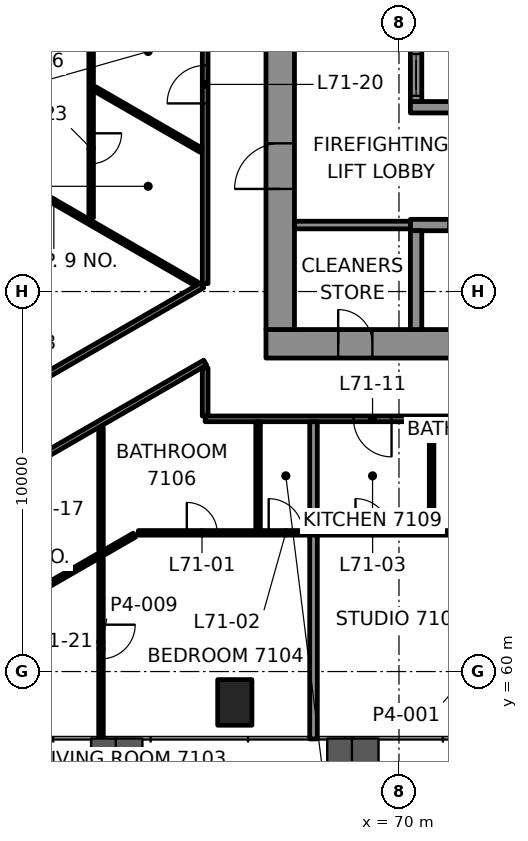
"""IFC4 building model, lengths in metres.
Left out: names, types, materials, properties, quantities, classifications, styles, units other than length and angle.
Written with IfcOpenShell. Run it as: python <this file> out.ifc"""

import sys

from ifc_helpers import new_model, si_unit, direction, frame, frame_2d, origin, origin_2d, place, context, subcontext, project, spatial, rectangle, hollow_rectangle, extrude, element, fill, save


model = new_model("IFC4")
c1 = context("Model", 3, precision=1e-05, world=origin(), true_north=direction((0.0, 1.0)))
c2 = subcontext(c1, "Body", "Model", "MODEL_VIEW")
j1 = project(units=[si_unit("LENGTHUNIT", "METRE"), si_unit("PLANEANGLEUNIT", "RADIAN")], contexts=[c1])
p1 = place(None, origin())
s1 = spatial("IfcSite", under=j1, at=p1, CompositionType="ELEMENT")
p2 = place(p1, origin())
s2 = spatial("IfcBuilding", under=s1, at=p2, CompositionType="ELEMENT")
p3 = place(p2, frame((0.0, 0.0, 295.1)))
s3 = spatial("IfcBuildingStorey", under=s2, at=p3, CompositionType="ELEMENT", Elevation=295.1)
p4 = place(p3, frame((65.68, 59.188, -0.0), z_axis=(0.0, 0.0, 1.0), x_axis=(1.0, 0.0, 0.0)))
e1 = element("IfcColumn", 1, at=p4, inside=s3, PredefinedType="COLUMN", context=c2, shape_type="SweptSolid", body=[
    extrude(hollow_rectangle(XDim=0.9, YDim=1.2, WallThickness=0.06, at=origin_2d()), origin(), (0.0, 0.0, 1.0), 3.5),
])
p5 = place(p3, frame((66.5, 68.625, 0.0), z_axis=(0.0, 0.0, 1.0), x_axis=(1.0, 0.0, 0.0)))
e2 = element("IfcWall", 2, at=p5, inside=s3, PredefinedType="SHEAR", context=c2, shape_type="SweptSolid", body=[
    extrude(rectangle(XDim=17.0, YDim=0.75, at=frame_2d((8.5, 0.0))), origin(), (0.0, 0.0, 1.0), 3.3),
])
p6 = place(p5, frame((1.9, 0.0, 0.0)))
e3 = element("IfcOpeningElement", 3, at=p6, cuts=e2, PredefinedType="OPENING", context=c2, shape_type="SweptSolid", body=[
    extrude(rectangle(XDim=0.9, YDim=2.1, at=frame_2d((0.45, 1.05))), frame((0.0, 0.385, 0.0), z_axis=(0.0, -1.0, 0.0), x_axis=(1.0, 0.0, 0.0)), (0.0, 0.0, 1.0), 0.77),
])
p7 = place(p3, frame((66.875, 69.0, 0.0), z_axis=(0.0, 0.0, 1.0), x_axis=(0.0, 1.0, 0.0)))
e4 = element("IfcWall", 4, at=p7, inside=s3, PredefinedType="SHEAR", context=c2, shape_type="SweptSolid", body=[
    extrude(rectangle(XDim=12.0, YDim=0.75, at=frame_2d((6.0, 0.0))), origin(), (0.0, 0.0, 1.0), 3.3),
])
p8 = place(p7, frame((3.7, 0.0, 0.0)))
e5 = element("IfcOpeningElement", 5, at=p8, cuts=e4, PredefinedType="OPENING", context=c2, shape_type="SweptSolid", body=[
    extrude(rectangle(XDim=1.2, YDim=2.1, at=frame_2d((0.6, 1.05))), frame((0.0, 0.385, 0.0), z_axis=(0.0, -1.0, 0.0), x_axis=(1.0, 0.0, 0.0)), (0.0, 0.0, 1.0), 0.77),
])
p9 = place(p3, frame((70.3, 71.75, 0.0), z_axis=(0.0, 0.0, 1.0), x_axis=(1.0, 0.0, 0.0)))
e6 = element("IfcWall", 6, at=p9, inside=s3, PredefinedType="SHEAR", context=c2, shape_type="SweptSolid", body=[
    extrude(rectangle(XDim=11.5, YDim=0.3, at=frame_2d((5.75, 0.0))), origin(), (0.0, 0.0, 1.0), 3.3),
])
p10 = place(p9, frame((1.0, 0.0, 0.0)))
e7 = element("IfcOpeningElement", 7, at=p10, cuts=e6, PredefinedType="OPENING", context=c2, shape_type="SweptSolid", body=[
    extrude(rectangle(XDim=1.1, YDim=2.1, at=frame_2d((0.55, 1.05))), frame((0.0, 0.16, 0.0), z_axis=(0.0, -1.0, 0.0), x_axis=(1.0, 0.0, 0.0)), (0.0, 0.0, 1.0), 0.32),
])
p11 = place(p9, frame((3.8, 0.0, 0.0)))
e8 = element("IfcOpeningElement", 8, at=p11, cuts=e6, PredefinedType="OPENING", context=c2, shape_type="SweptSolid", body=[
    extrude(rectangle(XDim=1.1, YDim=2.1, at=frame_2d((0.55, 1.05))), frame((0.0, 0.16, 0.0), z_axis=(0.0, -1.0, 0.0), x_axis=(1.0, 0.0, 0.0)), (0.0, 0.0, 1.0), 0.32),
])
p12 = place(p9, frame((6.6, 0.0, 0.0)))
e9 = element("IfcOpeningElement", 9, at=p12, cuts=e6, PredefinedType="OPENING", context=c2, shape_type="SweptSolid", body=[
    extrude(rectangle(XDim=1.1, YDim=2.1, at=frame_2d((0.55, 1.05))), frame((0.0, 0.16, 0.0), z_axis=(0.0, -1.0, 0.0), x_axis=(1.0, 0.0, 0.0)), (0.0, 0.0, 1.0), 0.32),
])
p13 = place(p9, frame((9.4, 0.0, 0.0)))
e10 = element("IfcOpeningElement", 10, at=p13, cuts=e6, PredefinedType="OPENING", context=c2, shape_type="SweptSolid", body=[
    extrude(rectangle(XDim=1.1, YDim=2.1, at=frame_2d((0.55, 1.05))), frame((0.0, 0.16, 0.0), z_axis=(0.0, -1.0, 0.0), x_axis=(1.0, 0.0, 0.0)), (0.0, 0.0, 1.0), 0.32),
])
p14 = place(p3, frame((70.3, 74.85, 0.0), z_axis=(0.0, 0.0, 1.0), x_axis=(1.0, 0.0, 0.0)))
e11 = element("IfcWall", 11, at=p14, inside=s3, PredefinedType="SHEAR", context=c2, shape_type="SweptSolid", body=[
    extrude(rectangle(XDim=5.9, YDim=0.3, at=frame_2d((2.95, 0.0))), origin(), (0.0, 0.0, 1.0), 3.3),
])
p15 = place(p14, frame((3.8, 0.0, 0.0)))
e12 = element("IfcOpeningElement", 12, at=p15, cuts=e11, PredefinedType="OPENING", context=c2, shape_type="SweptSolid", body=[
    extrude(rectangle(XDim=1.1, YDim=2.1, at=frame_2d((0.55, 1.05))), frame((0.0, 0.16, 0.0), z_axis=(0.0, -1.0, 0.0), x_axis=(1.0, 0.0, 0.0)), (0.0, 0.0, 1.0), 0.32),
])
p16 = place(p3, frame((70.45, 69.0, 0.0), z_axis=(0.0, 0.0, 1.0), x_axis=(0.0, 1.0, 0.0)))
e13 = element("IfcWall", 13, at=p16, inside=s3, PredefinedType="SHEAR", context=c2, shape_type="SweptSolid", body=[
    extrude(rectangle(XDim=2.6, YDim=0.3, at=frame_2d((1.3, 0.0))), origin(), (0.0, 0.0, 1.0), 3.3),
])
p17 = place(p3, frame((70.45, 75.0, 0.0), z_axis=(0.0, 0.0, 1.0), x_axis=(0.0, 1.0, 0.0)))
e14 = element("IfcWall", 14, at=p17, inside=s3, PredefinedType="SHEAR", context=c2, shape_type="SweptSolid", body=[
    extrude(rectangle(XDim=2.6, YDim=0.3, at=frame_2d((1.3, 0.0))), origin(), (0.0, 0.0, 1.0), 3.3),
])
p18 = place(p17, frame((0.15, 0.0, 0.0)))
e15 = element("IfcOpeningElement", 15, at=p18, cuts=e14, PredefinedType="OPENING", context=c2, shape_type="SweptSolid", body=[
    extrude(rectangle(XDim=1.1, YDim=2.1, at=frame_2d((0.55, 1.05))), frame((0.0, 0.16, 0.0), z_axis=(0.0, -1.0, 0.0), x_axis=(1.0, 0.0, 0.0)), (0.0, 0.0, 1.0), 0.32),
])
p19 = place(p3, frame((63.141, 63.65, 0.0), z_axis=(0.0, 0.0, 1.0), x_axis=(1.0, 0.0, 0.0)))
e16 = element("IfcWall", 16, at=p19, inside=s3, PredefinedType="PARTITIONING", context=c2, shape_type="SweptSolid", body=[
    extrude(rectangle(XDim=23.718, YDim=0.12, at=frame_2d((11.859, 0.0))), origin(), (0.0, 0.0, 1.0), 2.7),
])
p20 = place(p19, frame((1.276, 0.0, 0.0)))
e17 = element("IfcOpeningElement", 17, at=p20, cuts=e16, PredefinedType="OPENING", context=c2, shape_type="SweptSolid", body=[
    extrude(rectangle(XDim=0.8, YDim=2.1, at=frame_2d((0.4, 1.05))), frame((0.0, 0.07, 0.0), z_axis=(0.0, -1.0, 0.0), x_axis=(1.0, 0.0, 0.0)), (0.0, 0.0, 1.0), 0.14),
])
p21 = place(p19, frame((3.43, 0.0, 0.0)))
e18 = element("IfcOpeningElement", 18, at=p21, cuts=e16, PredefinedType="OPENING", context=c2, shape_type="SweptSolid", body=[
    extrude(rectangle(XDim=0.9, YDim=2.1, at=frame_2d((0.45, 1.05))), frame((0.0, 0.07, 0.0), z_axis=(0.0, -1.0, 0.0), x_axis=(1.0, 0.0, 0.0)), (0.0, 0.0, 1.0), 0.14),
])
p22 = place(p19, frame((5.715, 0.0, 0.0)))
e19 = element("IfcOpeningElement", 19, at=p22, cuts=e16, PredefinedType="OPENING", context=c2, shape_type="SweptSolid", body=[
    extrude(rectangle(XDim=0.9, YDim=2.1, at=frame_2d((0.45, 1.05))), frame((0.0, 0.07, 0.0), z_axis=(0.0, -1.0, 0.0), x_axis=(1.0, 0.0, 0.0)), (0.0, 0.0, 1.0), 0.14),
])
p23 = place(p19, frame((8.87, 0.0, 0.0)))
e20 = element("IfcOpeningElement", 20, at=p23, cuts=e16, PredefinedType="OPENING", context=c2, shape_type="SweptSolid", body=[
    extrude(rectangle(XDim=0.8, YDim=2.1, at=frame_2d((0.4, 1.05))), frame((0.0, 0.07, 0.0), z_axis=(0.0, -1.0, 0.0), x_axis=(1.0, 0.0, 0.0)), (0.0, 0.0, 1.0), 0.14),
])
p24 = place(p19, frame((11.928, 0.0, 0.0)))
e21 = element("IfcOpeningElement", 21, at=p24, cuts=e16, PredefinedType="OPENING", context=c2, shape_type="SweptSolid", body=[
    extrude(rectangle(XDim=0.9, YDim=2.1, at=frame_2d((0.45, 1.05))), frame((0.0, 0.07, 0.0), z_axis=(0.0, -1.0, 0.0), x_axis=(1.0, 0.0, 0.0)), (0.0, 0.0, 1.0), 0.14),
])
p25 = place(p19, frame((15.083, 0.0, 0.0)))
e22 = element("IfcOpeningElement", 22, at=p25, cuts=e16, PredefinedType="OPENING", context=c2, shape_type="SweptSolid", body=[
    extrude(rectangle(XDim=0.8, YDim=2.1, at=frame_2d((0.4, 1.05))), frame((0.0, 0.07, 0.0), z_axis=(0.0, -1.0, 0.0), x_axis=(1.0, 0.0, 0.0)), (0.0, 0.0, 1.0), 0.14),
])
p26 = place(p19, frame((18.141, 0.0, 0.0)))
e23 = element("IfcOpeningElement", 23, at=p26, cuts=e16, PredefinedType="OPENING", context=c2, shape_type="SweptSolid", body=[
    extrude(rectangle(XDim=0.9, YDim=2.1, at=frame_2d((0.45, 1.05))), frame((0.0, 0.07, 0.0), z_axis=(0.0, -1.0, 0.0), x_axis=(1.0, 0.0, 0.0)), (0.0, 0.0, 1.0), 0.14),
])
p27 = place(p19, frame((21.297, 0.0, 0.0)))
e24 = element("IfcOpeningElement", 24, at=p27, cuts=e16, PredefinedType="OPENING", context=c2, shape_type="SweptSolid", body=[
    extrude(rectangle(XDim=0.8, YDim=2.1, at=frame_2d((0.4, 1.05))), frame((0.0, 0.07, 0.0), z_axis=(0.0, -1.0, 0.0), x_axis=(1.0, 0.0, 0.0)), (0.0, 0.0, 1.0), 0.14),
])
p28 = place(p3, frame((85.1, 66.65, 0.0), z_axis=(0.0, 0.0, 1.0), x_axis=(-1.0, 0.0, 0.0)))
e25 = element("IfcWall", 25, at=p28, inside=s3, PredefinedType="PARTITIONING", context=c2, shape_type="SweptSolid", body=[
    extrude(rectangle(XDim=20.2, YDim=0.15, at=frame_2d((10.1, 0.0))), origin(), (0.0, 0.0, 1.0), 2.7),
])
p29 = place(p28, frame((2.869, 0.0, 0.0)))
e26 = element("IfcOpeningElement", 26, at=p29, cuts=e25, PredefinedType="OPENING", context=c2, shape_type="SweptSolid", body=[
    extrude(rectangle(XDim=1.0, YDim=2.1, at=frame_2d((0.5, 1.05))), frame((0.0, 0.085, 0.0), z_axis=(0.0, -1.0, 0.0), x_axis=(1.0, 0.0, 0.0)), (0.0, 0.0, 1.0), 0.17),
])
p30 = place(p28, frame((9.082, 0.0, 0.0)))
e27 = element("IfcOpeningElement", 27, at=p30, cuts=e25, PredefinedType="OPENING", context=c2, shape_type="SweptSolid", body=[
    extrude(rectangle(XDim=1.0, YDim=2.1, at=frame_2d((0.5, 1.05))), frame((0.0, 0.085, 0.0), z_axis=(0.0, -1.0, 0.0), x_axis=(1.0, 0.0, 0.0)), (0.0, 0.0, 1.0), 0.17),
])
p31 = place(p28, frame((15.296, 0.0, 0.0)))
e28 = element("IfcOpeningElement", 28, at=p31, cuts=e25, PredefinedType="OPENING", context=c2, shape_type="SweptSolid", body=[
    extrude(rectangle(XDim=1.0, YDim=2.1, at=frame_2d((0.5, 1.05))), frame((0.0, 0.085, 0.0), z_axis=(0.0, -1.0, 0.0), x_axis=(1.0, 0.0, 0.0)), (0.0, 0.0, 1.0), 0.17),
])
p32 = place(p3, frame((63.037, 63.59, 0.0), z_axis=(0.0, 0.0, 1.0), x_axis=(-0.866021245731, -0.500007201891, 0.0)))
e29 = element("IfcWall", 29, at=p32, inside=s3, PredefinedType="PARTITIONING", context=c2, shape_type="SweptSolid", body=[
    extrude(rectangle(XDim=8.906, YDim=0.12, at=frame_2d((4.453, 0.0))), origin(), (0.0, 0.0, 1.0), 2.7),
])
p33 = place(p32, frame((4.41, 0.0, 0.0)))
e30 = element("IfcOpeningElement", 30, at=p33, cuts=e29, PredefinedType="OPENING", context=c2, shape_type="SweptSolid", body=[
    extrude(rectangle(XDim=0.9, YDim=2.1, at=frame_2d((0.45, 1.05))), frame((0.0, 0.07, 0.0), z_axis=(0.0, -1.0, 0.0), x_axis=(1.0, 0.0, 0.0)), (0.0, 0.0, 1.0), 0.14),
])
p34 = place(p3, frame((64.9, 68.13, 0.0), z_axis=(0.0, 0.0, 1.0), x_axis=(-0.866024746207, -0.500001138955, 0.0)))
e31 = element("IfcWall", 31, at=p34, inside=s3, PredefinedType="PARTITIONING", context=c2, shape_type="SweptSolid", body=[
    extrude(rectangle(XDim=12.007, YDim=0.15, at=frame_2d((6.003, 0.0))), origin(), (0.0, 0.0, 1.0), 2.547),
])
p35 = place(p34, frame((6.611, 0.0, 0.0)))
e32 = element("IfcOpeningElement", 32, at=p35, cuts=e31, PredefinedType="OPENING", context=c2, shape_type="SweptSolid", body=[
    extrude(rectangle(XDim=1.0, YDim=2.1, at=frame_2d((0.5, 1.05))), frame((0.0, 0.085, 0.0), z_axis=(0.0, -1.0, 0.0), x_axis=(1.0, 0.0, 0.0)), (0.0, 0.0, 1.0), 0.17),
])
p36 = place(p3, frame((53.601, 63.685, 0.0), z_axis=(0.0, 0.0, 1.0), x_axis=(0.866024967991, 0.500000754816, 0.0)))
e33 = element("IfcWall", 33, at=p36, inside=s3, PredefinedType="PARTITIONING", context=c2, shape_type="SweptSolid", body=[
    extrude(rectangle(XDim=12.96, YDim=0.15, at=frame_2d((6.48, 0.0))), origin(), (0.0, 0.0, 1.0), 2.7),
])
p37 = place(p36, frame((6.03, 0.0, 0.0)))
e34 = element("IfcOpeningElement", 34, at=p37, cuts=e33, PredefinedType="OPENING", context=c2, shape_type="SweptSolid", body=[
    extrude(rectangle(XDim=0.9, YDim=2.1, at=frame_2d((0.45, 1.05))), frame((0.0, 0.085, 0.0), z_axis=(0.0, -1.0, 0.0), x_axis=(1.0, 0.0, 0.0)), (0.0, 0.0, 1.0), 0.17),
])
p38 = place(p3, frame((70.858, 63.71, 0.0), z_axis=(0.0, 0.0, 1.0), x_axis=(0.0, 1.0, 0.0)))
e35 = element("IfcWall", 35, at=p38, inside=s3, PredefinedType="PARTITIONING", context=c2, shape_type="SweptSolid", body=[
    extrude(rectangle(XDim=2.865, YDim=0.12, at=frame_2d((1.433, 0.0))), origin(), (0.0, 0.0, 1.0), 2.7),
])
p39 = place(p3, frame((67.751, 58.228, 0.0), z_axis=(0.0, 0.0, 1.0), x_axis=(0.0, 1.0, 0.0)))
e36 = element("IfcWall", 36, at=p39, inside=s3, PredefinedType="PARTITIONING", context=c2, shape_type="SweptSolid", body=[
    extrude(rectangle(XDim=5.363, YDim=0.2, at=frame_2d((2.681, 0.0))), origin(), (0.0, 0.0, 1.0), 2.688),
])
p40 = place(p3, frame((66.292, 63.71, 0.0), z_axis=(0.0, 0.0, 1.0), x_axis=(0.0, 1.0, 0.0)))
e37 = element("IfcWall", 37, at=p40, inside=s3, PredefinedType="PARTITIONING", context=c2, shape_type="SweptSolid", body=[
    extrude(rectangle(XDim=2.865, YDim=0.12, at=frame_2d((1.433, 0.0))), origin(), (0.0, 0.0, 1.0), 2.7),
])
p41 = place(p3, frame((64.9, 66.725, 0.0), z_axis=(0.0, 0.0, 1.0), x_axis=(0.0, 1.0, 0.0)))
e38 = element("IfcWall", 38, at=p41, inside=s3, PredefinedType="PARTITIONING", context=c2, shape_type="SweptSolid", body=[
    extrude(rectangle(XDim=1.268, YDim=0.15, at=frame_2d((0.634, 0.0))), origin(), (0.0, 0.0, 1.0), 2.547),
])
p42 = place(p3, frame((64.9, 70.208, 0.0), z_axis=(0.0, 0.0, 1.0), x_axis=(0.0, 1.0, 0.0)))
e39 = element("IfcWall", 39, at=p42, inside=s3, PredefinedType="PARTITIONING", context=c2, shape_type="SweptSolid", body=[
    extrude(rectangle(XDim=13.14, YDim=0.15, at=frame_2d((6.57, 0.0))), origin(), (0.0, 0.0, 1.0), 2.7),
])
p43 = place(p42, frame((4.743, 0.0, 0.0)))
e40 = element("IfcOpeningElement", 40, at=p43, cuts=e39, PredefinedType="OPENING", context=c2, shape_type="SweptSolid", body=[
    extrude(rectangle(XDim=1.0, YDim=2.1, at=frame_2d((0.5, 1.05))), frame((0.0, 0.085, 0.0), z_axis=(0.0, -1.0, 0.0), x_axis=(1.0, 0.0, 0.0)), (0.0, 0.0, 1.0), 0.17),
])
p44 = place(p3, frame((62.159, 62.979, 0.0), z_axis=(0.0, 0.0, 1.0), x_axis=(0.0, -1.0, 0.0)))
e41 = element("IfcWall", 41, at=p44, inside=s3, PredefinedType="PARTITIONING", context=c2, shape_type="SweptSolid", body=[
    extrude(rectangle(XDim=4.751, YDim=0.12, at=frame_2d((2.376, 0.0))), origin(), (0.0, 0.0, 1.0), 2.688),
])
p45 = place(p44, frame((1.746, 0.0, 0.0)))
e42 = element("IfcOpeningElement", 42, at=p45, cuts=e41, PredefinedType="OPENING", context=c2, shape_type="SweptSolid", body=[
    extrude(rectangle(XDim=0.9, YDim=2.1, at=frame_2d((0.45, 1.05))), frame((0.0, 0.07, 0.0), z_axis=(0.0, -1.0, 0.0), x_axis=(1.0, 0.0, 0.0)), (0.0, 0.0, 1.0), 0.14),
])
p46 = place(p3, frame((61.9, 85.855, 0.0), z_axis=(0.0, 0.0, 1.0), x_axis=(0.0, -1.0, 0.0)))
e43 = element("IfcWall", 43, at=p46, inside=s3, PredefinedType="PARTITIONING", context=c2, shape_type="SweptSolid", body=[
    extrude(rectangle(XDim=13.915, YDim=0.12, at=frame_2d((6.958, 0.0))), origin(), (0.0, 0.0, 1.0), 2.688),
])
p47 = place(p46, frame((8.224, 0.0, 0.0)))
e44 = element("IfcOpeningElement", 44, at=p47, cuts=e43, PredefinedType="OPENING", context=c2, shape_type="SweptSolid", body=[
    extrude(rectangle(XDim=0.9, YDim=2.1, at=frame_2d((0.45, 1.05))), frame((0.0, 0.07, 0.0), z_axis=(0.0, -1.0, 0.0), x_axis=(1.0, 0.0, 0.0)), (0.0, 0.0, 1.0), 0.14),
])
p48 = place(p46, frame((11.69, 0.0, 0.0)))
e45 = element("IfcOpeningElement", 45, at=p48, cuts=e43, PredefinedType="OPENING", context=c2, shape_type="SweptSolid", body=[
    extrude(rectangle(XDim=0.8, YDim=2.1, at=frame_2d((0.4, 1.05))), frame((0.0, 0.07, 0.0), z_axis=(0.0, -1.0, 0.0), x_axis=(1.0, 0.0, 0.0)), (0.0, 0.0, 1.0), 0.14),
])
p49 = place(p3, frame((64.791, 73.72, 0.0), z_axis=(0.0, 0.0, 1.0), x_axis=(-0.866033195618, 0.499986503906, 0.0)))
e46 = element("IfcWall", 46, at=p49, inside=s3, PredefinedType="PARTITIONING", context=c2, shape_type="SweptSolid", body=[
    extrude(rectangle(XDim=3.228, YDim=0.12, at=frame_2d((1.614, 0.0))), origin(), (0.0, 0.0, 1.0), 2.7),
])
p50 = place(p3, frame((64.67, 70.202, 0.0), z_axis=(0.0, 0.0, 1.0), x_axis=(-0.866027476775, 0.499996409458, 0.0)))
e47 = element("IfcWall", 47, at=p50, inside=s3, PredefinedType="PARTITIONING", context=c2, shape_type="SweptSolid", body=[
    extrude(rectangle(XDim=8.666, YDim=0.12, at=frame_2d((4.333, 0.0))), origin(), (0.0, 0.0, 1.0), 2.7),
])
p51 = place(p3, frame((62.159, 63.187, 0.0), z_axis=(0.0, 0.0, 1.0), x_axis=(0.0, 1.0, 0.0)))
e48 = element("IfcWall", 48, at=p51, inside=s3, PredefinedType="PARTITIONING", context=c2, shape_type="SweptSolid", body=[
    extrude(rectangle(XDim=3.233, YDim=0.12, at=frame_2d((1.617, 0.0))), origin(), (0.0, 0.0, 1.0), 2.547),
])
p52 = place(p3, frame((67.751, 63.71, 0.0), z_axis=(0.0, 0.0, 1.0), x_axis=(0.0, 1.0, 0.0)))
e49 = element("IfcWall", 49, at=p52, inside=s3, PredefinedType="PARTITIONING", context=c2, shape_type="SweptSolid", body=[
    extrude(rectangle(XDim=2.865, YDim=0.2, at=frame_2d((1.433, 0.0))), origin(), (0.0, 0.0, 1.0), 2.7),
])
p53 = place(p3, frame((67.25, 71.75, 0.0), z_axis=(0.0, 0.0, 1.0), x_axis=(1.0, 0.0, 0.0)))
e50 = element("IfcWall", 50, at=p53, inside=s3, PredefinedType="PARTITIONING", context=c2, shape_type="SweptSolid", body=[
    extrude(rectangle(XDim=3.05, YDim=0.2, at=frame_2d((1.525, 0.0))), origin(), (0.0, 0.0, 1.0), 3.3),
])
p54 = place(p20, origin())
e51 = element("IfcDoor", 51, at=p54, inside=s3, OperationType="SINGLE_SWING_RIGHT", PredefinedType="DOOR", context=c2, shape_type="SweptSolid", body=[
    extrude(rectangle(XDim=0.8, YDim=2.1, at=frame_2d((0.4, 1.05))), frame((0.0, 0.025, 0.0), z_axis=(0.0, -1.0, 0.0), x_axis=(1.0, 0.0, 0.0)), (0.0, 0.0, 1.0), 0.05),
])
fill(e17, e51)
p55 = place(p21, origin())
e52 = element("IfcDoor", 52, at=p55, inside=s3, OperationType="SINGLE_SWING_LEFT", PredefinedType="DOOR", context=c2, shape_type="SweptSolid", body=[
    extrude(rectangle(XDim=0.9, YDim=2.1, at=frame_2d((0.45, 1.05))), frame((0.0, 0.025, 0.0), z_axis=(0.0, -1.0, 0.0), x_axis=(1.0, 0.0, 0.0)), (0.0, 0.0, 1.0), 0.05),
])
fill(e18, e52)
p56 = place(p22, origin())
e53 = element("IfcDoor", 53, at=p56, inside=s3, OperationType="SINGLE_SWING_LEFT", PredefinedType="DOOR", context=c2, shape_type="SweptSolid", body=[
    extrude(rectangle(XDim=0.9, YDim=2.1, at=frame_2d((0.45, 1.05))), frame((0.0, 0.025, 0.0), z_axis=(0.0, -1.0, 0.0), x_axis=(1.0, 0.0, 0.0)), (0.0, 0.0, 1.0), 0.05),
])
fill(e19, e53)
p57 = place(p31, origin())
e54 = element("IfcDoor", 54, at=p57, inside=s3, OperationType="SINGLE_SWING_LEFT", PredefinedType="DOOR", context=c2, shape_type="SweptSolid", body=[
    extrude(rectangle(XDim=1.0, YDim=2.1, at=frame_2d((0.5, 1.05))), frame((0.0, 0.025, 0.0), z_axis=(0.0, -1.0, 0.0), x_axis=(1.0, 0.0, 0.0)), (0.0, 0.0, 1.0), 0.05),
])
fill(e28, e54)
p58 = place(p43, origin())
e55 = element("IfcDoor", 55, at=p58, inside=s3, OperationType="SINGLE_SWING_RIGHT", PredefinedType="DOOR", context=c2, shape_type="SweptSolid", body=[
    extrude(rectangle(XDim=1.0, YDim=2.1, at=frame_2d((0.5, 1.05))), frame((0.0, 0.025, 0.0), z_axis=(0.0, -1.0, 0.0), x_axis=(1.0, 0.0, 0.0)), (0.0, 0.0, 1.0), 0.05),
])
fill(e40, e55)
p59 = place(p45, origin())
e56 = element("IfcDoor", 56, at=p59, inside=s3, OperationType="SINGLE_SWING_LEFT", PredefinedType="DOOR", context=c2, shape_type="SweptSolid", body=[
    extrude(rectangle(XDim=0.9, YDim=2.1, at=frame_2d((0.45, 1.05))), frame((0.0, 0.025, 0.0), z_axis=(0.0, -1.0, 0.0), x_axis=(1.0, 0.0, 0.0)), (0.0, 0.0, 1.0), 0.05),
])
fill(e42, e56)
p60 = place(p48, origin())
e57 = element("IfcDoor", 57, at=p60, inside=s3, OperationType="SINGLE_SWING_RIGHT", PredefinedType="DOOR", context=c2, shape_type="SweptSolid", body=[
    extrude(rectangle(XDim=0.8, YDim=2.1, at=frame_2d((0.4, 1.05))), frame((0.0, 0.025, 0.0), z_axis=(0.0, -1.0, 0.0), x_axis=(1.0, 0.0, 0.0)), (0.0, 0.0, 1.0), 0.05),
])
fill(e45, e57)
p61 = place(p18, origin())
e58 = element("IfcDoor", 58, at=p61, inside=s3, OperationType="DOUBLE_DOOR_SLIDING", PredefinedType="DOOR", context=c2, shape_type="SweptSolid", body=[
    extrude(rectangle(XDim=1.1, YDim=2.1, at=frame_2d((0.55, 1.05))), frame((0.0, 0.025, 0.0), z_axis=(0.0, -1.0, 0.0), x_axis=(1.0, 0.0, 0.0)), (0.0, 0.0, 1.0), 0.05),
])
fill(e15, e58)
p62 = place(p8, origin())
e59 = element("IfcDoor", 59, at=p62, inside=s3, OperationType="SINGLE_SWING_RIGHT", PredefinedType="DOOR", context=c2, shape_type="SweptSolid", body=[
    extrude(rectangle(XDim=1.2, YDim=2.1, at=frame_2d((0.6, 1.05))), frame((0.0, 0.095, 0.0), z_axis=(0.0, -1.0, 0.0), x_axis=(1.0, 0.0, 0.0)), (0.0, 0.0, 1.0), 0.19),
])
fill(e5, e59)
p63 = place(p6, origin())
e60 = element("IfcDoor", 60, at=p63, inside=s3, OperationType="SINGLE_SWING_RIGHT", PredefinedType="DOOR", context=c2, shape_type="SweptSolid", body=[
    extrude(rectangle(XDim=0.9, YDim=2.1, at=frame_2d((0.45, 1.05))), frame((0.0, 0.095, 0.0), z_axis=(0.0, -1.0, 0.0), x_axis=(1.0, 0.0, 0.0)), (0.0, 0.0, 1.0), 0.19),
])
fill(e3, e60)
save(model, sys.argv[1])
